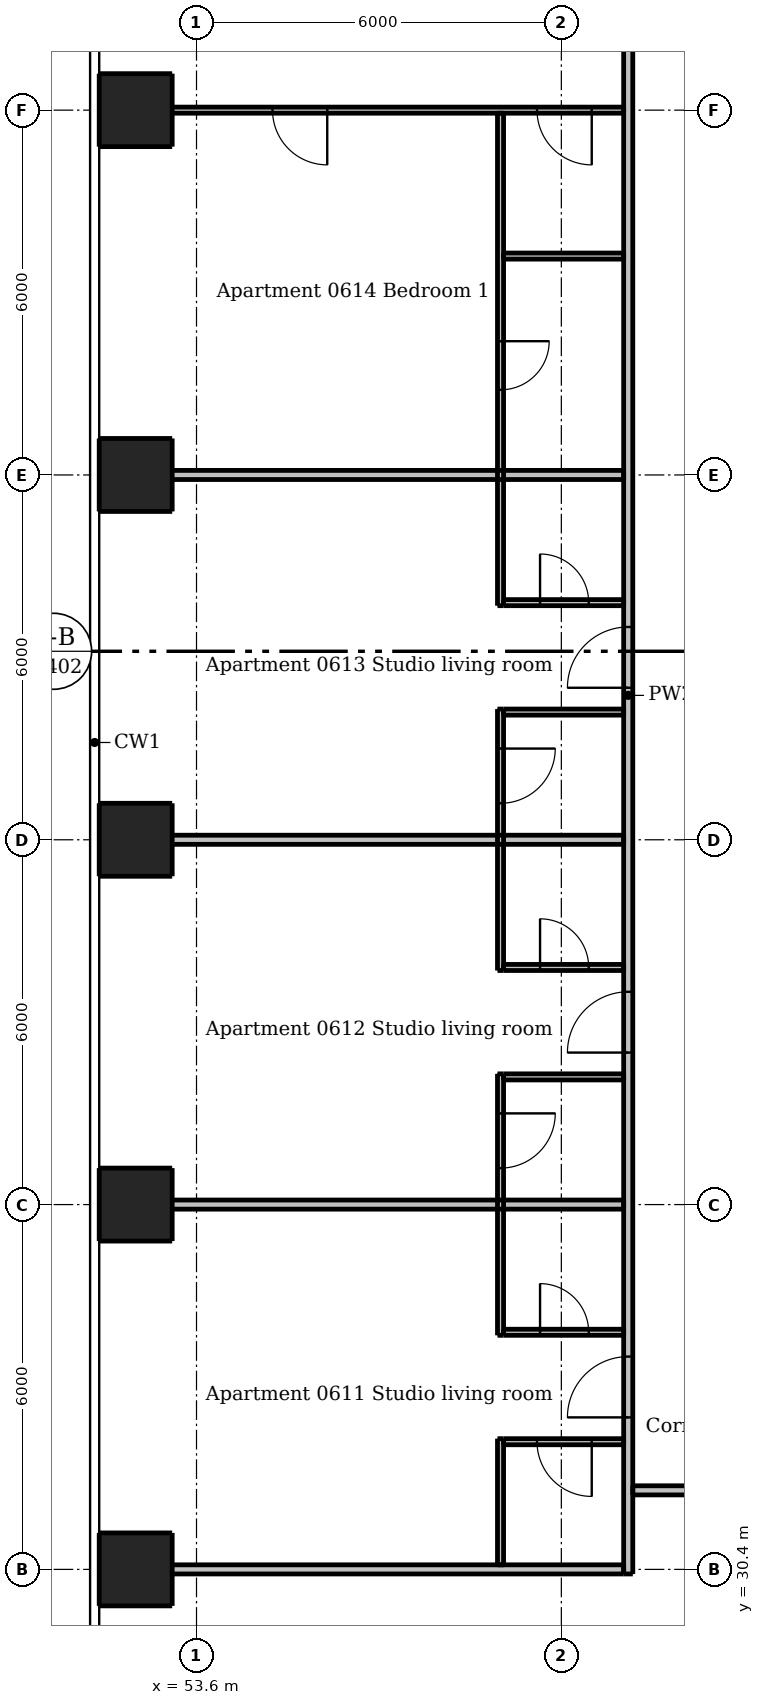
"""IFC4 building model, lengths in metres.
Left out: names, types, materials, properties, quantities, classifications, styles, units other than length and angle.
Written with IfcOpenShell. Run it as: python <this file> out.ifc"""

import sys

from ifc_helpers import new_model, si_unit, direction, frame, frame_2d, origin, origin_2d, place, context, subcontext, project, spatial, rectangle, extrude, element, fill, save


model = new_model("IFC4")
c1 = context("Model", 3, precision=1e-05, world=origin(), true_north=direction((0.0, 1.0)))
c2 = subcontext(c1, "Body", "Model", "MODEL_VIEW")
j1 = project(units=[si_unit("LENGTHUNIT", "METRE"), si_unit("PLANEANGLEUNIT", "RADIAN")], contexts=[c1])
p1 = place(None, origin())
s1 = spatial("IfcSite", under=j1, at=p1, CompositionType="ELEMENT")
p2 = place(p1, origin())
s2 = spatial("IfcBuilding", under=s1, at=p2, CompositionType="ELEMENT")
p3 = place(p2, frame((0.0, 0.0, 26.8)))
s3 = spatial("IfcBuildingStorey", under=s2, at=p3, CompositionType="ELEMENT", Elevation=26.8)
for number, where, z_axis, x_axis in (
    (1, (52.6, 30.4, 0.0), (0.0, 0.0, 1.0), (1.0, 0.0, 0.0)),
    (2, (52.6, 36.4, 0.0), (0.0, 0.0, 1.0), (1.0, 0.0, 0.0)),
    (3, (52.6, 42.4, 0.0), (0.0, 0.0, 1.0), (1.0, 0.0, 0.0)),
    (4, (52.6, 48.4, 0.0), (0.0, 0.0, 1.0), (1.0, 0.0, 0.0)),
    (5, (52.6, 54.4, 0.0), (0.0, 0.0, 1.0), (1.0, 0.0, 0.0)),
):
    element("IfcColumn", number, at=place(p3, frame(where, z_axis=z_axis, x_axis=x_axis)), inside=s3, PredefinedType="COLUMN", context=c2, shape_type="SweptSolid", body=[
        extrude(rectangle(XDim=1.2, YDim=1.2, at=origin_2d()), origin(), (0.0, 0.0, 1.0), 3.05),
    ])
p4 = place(p3, frame((58.6, 30.475, 0.0), z_axis=(0.0, 0.0, 1.0), x_axis=(0.0, 1.0, 0.0)))
e6 = element("IfcWall", 6, at=p4, inside=s3, PredefinedType="PARTITIONING", context=c2, shape_type="SweptSolid", body=[
    extrude(rectangle(XDim=2.075, YDim=0.1, at=frame_2d((1.038, 0.0))), origin(), (0.0, 0.0, 1.0), 3.05),
])
p5 = place(p3, frame((58.6, 38.55, 0.0), z_axis=(0.0, 0.0, 1.0), x_axis=(0.0, -1.0, 0.0)))
e7 = element("IfcWall", 7, at=p5, inside=s3, PredefinedType="PARTITIONING", context=c2, shape_type="SweptSolid", body=[
    extrude(rectangle(XDim=4.3, YDim=0.1, at=frame_2d((2.15, 0.0))), origin(), (0.0, 0.0, 1.0), 3.05),
])
p6 = place(p5, frame((0.65, 0.0, 0.0)))
e8 = element("IfcOpeningElement", 8, at=p6, cuts=e7, PredefinedType="OPENING", context=c2, shape_type="SweptSolid", body=[
    extrude(rectangle(XDim=0.9, YDim=2.1, at=frame_2d((0.45, 1.05))), frame((0.0, 0.06, 0.0), z_axis=(0.0, -1.0, 0.0), x_axis=(1.0, 0.0, 0.0)), (0.0, 0.0, 1.0), 0.12),
])
p7 = place(p3, frame((58.6, 44.55, 0.0), z_axis=(0.0, 0.0, 1.0), x_axis=(0.0, -1.0, 0.0)))
e9 = element("IfcWall", 9, at=p7, inside=s3, PredefinedType="PARTITIONING", context=c2, shape_type="SweptSolid", body=[
    extrude(rectangle(XDim=4.3, YDim=0.1, at=frame_2d((2.15, 0.0))), origin(), (0.0, 0.0, 1.0), 3.05),
])
p8 = place(p7, frame((0.65, 0.0, 0.0)))
e10 = element("IfcOpeningElement", 10, at=p8, cuts=e9, PredefinedType="OPENING", context=c2, shape_type="SweptSolid", body=[
    extrude(rectangle(XDim=0.9, YDim=2.1, at=frame_2d((0.45, 1.05))), frame((0.0, 0.06, 0.0), z_axis=(0.0, -1.0, 0.0), x_axis=(1.0, 0.0, 0.0)), (0.0, 0.0, 1.0), 0.12),
])
p9 = place(p3, frame((58.6, 54.35, 0.0), z_axis=(0.0, 0.0, 1.0), x_axis=(0.0, -1.0, 0.0)))
e11 = element("IfcWall", 11, at=p9, inside=s3, PredefinedType="PARTITIONING", context=c2, shape_type="SweptSolid", body=[
    extrude(rectangle(XDim=8.1, YDim=0.1, at=frame_2d((4.05, 0.0))), origin(), (0.0, 0.0, 1.0), 3.05),
])
p10 = place(p9, frame((3.75, 0.0, 0.0)))
e12 = element("IfcOpeningElement", 12, at=p10, cuts=e11, PredefinedType="OPENING", context=c2, shape_type="SweptSolid", body=[
    extrude(rectangle(XDim=0.8, YDim=2.1, at=frame_2d((0.4, 1.05))), frame((0.0, 0.06, 0.0), z_axis=(0.0, -1.0, 0.0), x_axis=(1.0, 0.0, 0.0)), (0.0, 0.0, 1.0), 0.12),
])
p11 = place(p3, frame((60.625, 54.4, 0.0), z_axis=(0.0, 0.0, 1.0), x_axis=(-1.0, 0.0, 0.0)))
e13 = element("IfcWall", 13, at=p11, inside=s3, PredefinedType="PARTITIONING", context=c2, shape_type="SweptSolid", body=[
    extrude(rectangle(XDim=8.625, YDim=0.1, at=frame_2d((4.312, 0.0))), origin(), (0.0, 0.0, 1.0), 2.516),
])
p12 = place(p11, frame((0.525, 0.0, 0.0)))
e14 = element("IfcOpeningElement", 14, at=p12, cuts=e13, PredefinedType="OPENING", context=c2, shape_type="SweptSolid", body=[
    extrude(rectangle(XDim=0.9, YDim=2.1, at=frame_2d((0.45, 1.05))), frame((0.0, 0.06, 0.0), z_axis=(0.0, -1.0, 0.0), x_axis=(1.0, 0.0, 0.0)), (0.0, 0.0, 1.0), 0.12),
])
p13 = place(p11, frame((4.875, 0.0, 0.0)))
e15 = element("IfcOpeningElement", 15, at=p13, cuts=e13, PredefinedType="OPENING", context=c2, shape_type="SweptSolid", body=[
    extrude(rectangle(XDim=0.9, YDim=2.1, at=frame_2d((0.45, 1.05))), frame((0.0, 0.06, 0.0), z_axis=(0.0, -1.0, 0.0), x_axis=(1.0, 0.0, 0.0)), (0.0, 0.0, 1.0), 0.12),
])
p14 = place(p3, frame((58.65, 52.0, 0.0), z_axis=(0.0, 0.0, 1.0), x_axis=(1.0, 0.0, 0.0)))
e16 = element("IfcWall", 16, at=p14, inside=s3, PredefinedType="PARTITIONING", context=c2, shape_type="SweptSolid", body=[
    extrude(rectangle(XDim=1.975, YDim=0.1, at=frame_2d((0.988, 0.0))), origin(), (0.0, 0.0, 1.0), 3.05),
])
p15 = place(p3, frame((58.65, 46.3, 0.0), z_axis=(0.0, 0.0, 1.0), x_axis=(1.0, 0.0, 0.0)))
e17 = element("IfcWall", 17, at=p15, inside=s3, PredefinedType="PARTITIONING", context=c2, shape_type="SweptSolid", body=[
    extrude(rectangle(XDim=1.975, YDim=0.1, at=frame_2d((0.988, 0.0))), origin(), (0.0, 0.0, 1.0), 3.05),
])
p16 = place(p15, frame((0.6, 0.0, 0.0)))
e18 = element("IfcOpeningElement", 18, at=p16, cuts=e17, PredefinedType="OPENING", context=c2, shape_type="SweptSolid", body=[
    extrude(rectangle(XDim=0.8, YDim=2.1, at=frame_2d((0.4, 1.05))), frame((0.0, 0.06, 0.0), z_axis=(0.0, -1.0, 0.0), x_axis=(1.0, 0.0, 0.0)), (0.0, 0.0, 1.0), 0.12),
])
p17 = place(p3, frame((58.65, 44.5, 0.0), z_axis=(0.0, 0.0, 1.0), x_axis=(1.0, 0.0, 0.0)))
e19 = element("IfcWall", 19, at=p17, inside=s3, PredefinedType="PARTITIONING", context=c2, shape_type="SweptSolid", body=[
    extrude(rectangle(XDim=1.975, YDim=0.1, at=frame_2d((0.988, 0.0))), origin(), (0.0, 0.0, 1.0), 3.05),
])
p18 = place(p3, frame((58.65, 40.3, 0.0), z_axis=(0.0, 0.0, 1.0), x_axis=(1.0, 0.0, 0.0)))
e20 = element("IfcWall", 20, at=p18, inside=s3, PredefinedType="PARTITIONING", context=c2, shape_type="SweptSolid", body=[
    extrude(rectangle(XDim=1.975, YDim=0.1, at=frame_2d((0.988, 0.0))), origin(), (0.0, 0.0, 1.0), 3.05),
])
p19 = place(p18, frame((0.6, 0.0, 0.0)))
e21 = element("IfcOpeningElement", 21, at=p19, cuts=e20, PredefinedType="OPENING", context=c2, shape_type="SweptSolid", body=[
    extrude(rectangle(XDim=0.8, YDim=2.1, at=frame_2d((0.4, 1.05))), frame((0.0, 0.06, 0.0), z_axis=(0.0, -1.0, 0.0), x_axis=(1.0, 0.0, 0.0)), (0.0, 0.0, 1.0), 0.12),
])
p20 = place(p3, frame((58.65, 38.5, 0.0), z_axis=(0.0, 0.0, 1.0), x_axis=(1.0, 0.0, 0.0)))
e22 = element("IfcWall", 22, at=p20, inside=s3, PredefinedType="PARTITIONING", context=c2, shape_type="SweptSolid", body=[
    extrude(rectangle(XDim=1.975, YDim=0.1, at=frame_2d((0.988, 0.0))), origin(), (0.0, 0.0, 1.0), 3.05),
])
p21 = place(p3, frame((58.65, 34.3, 0.0), z_axis=(0.0, 0.0, 1.0), x_axis=(1.0, 0.0, 0.0)))
e23 = element("IfcWall", 23, at=p21, inside=s3, PredefinedType="PARTITIONING", context=c2, shape_type="SweptSolid", body=[
    extrude(rectangle(XDim=1.975, YDim=0.1, at=frame_2d((0.988, 0.0))), origin(), (0.0, 0.0, 1.0), 3.05),
])
p22 = place(p21, frame((0.6, 0.0, 0.0)))
e24 = element("IfcOpeningElement", 24, at=p22, cuts=e23, PredefinedType="OPENING", context=c2, shape_type="SweptSolid", body=[
    extrude(rectangle(XDim=0.8, YDim=2.1, at=frame_2d((0.4, 1.05))), frame((0.0, 0.06, 0.0), z_axis=(0.0, -1.0, 0.0), x_axis=(1.0, 0.0, 0.0)), (0.0, 0.0, 1.0), 0.12),
])
p23 = place(p3, frame((60.625, 32.5, 0.0), z_axis=(0.0, 0.0, 1.0), x_axis=(-1.0, 0.0, 0.0)))
e25 = element("IfcWall", 25, at=p23, inside=s3, PredefinedType="PARTITIONING", context=c2, shape_type="SweptSolid", body=[
    extrude(rectangle(XDim=1.975, YDim=0.1, at=frame_2d((0.988, 0.0))), origin(), (0.0, 0.0, 1.0), 3.05),
])
p24 = place(p23, frame((0.525, 0.0, 0.0)))
e26 = element("IfcOpeningElement", 26, at=p24, cuts=e25, PredefinedType="OPENING", context=c2, shape_type="SweptSolid", body=[
    extrude(rectangle(XDim=0.9, YDim=2.1, at=frame_2d((0.45, 1.05))), frame((0.0, 0.06, 0.0), z_axis=(0.0, -1.0, 0.0), x_axis=(1.0, 0.0, 0.0)), (0.0, 0.0, 1.0), 0.12),
])
p25 = place(p3, frame((60.7, 30.325, 0.0), z_axis=(0.0, 0.0, 1.0), x_axis=(0.0, 1.0, 0.0)))
e27 = element("IfcWall", 27, at=p25, inside=s3, PredefinedType="PARTITIONING", context=c2, shape_type="SweptSolid", body=[
    extrude(rectangle(XDim=28.9, YDim=0.15, at=frame_2d((14.45, 0.0))), origin(), (0.0, 0.0, 1.0), 3.05),
])
p26 = place(p25, frame((2.575, 0.0, 0.0)))
e28 = element("IfcOpeningElement", 28, at=p26, cuts=e27, PredefinedType="OPENING", context=c2, shape_type="SweptSolid", body=[
    extrude(rectangle(XDim=1.0, YDim=2.1, at=frame_2d((0.5, 1.05))), frame((0.0, 0.085, 0.0), z_axis=(0.0, -1.0, 0.0), x_axis=(1.0, 0.0, 0.0)), (0.0, 0.0, 1.0), 0.17),
])
p27 = place(p25, frame((8.575, 0.0, 0.0)))
e29 = element("IfcOpeningElement", 29, at=p27, cuts=e27, PredefinedType="OPENING", context=c2, shape_type="SweptSolid", body=[
    extrude(rectangle(XDim=1.0, YDim=2.1, at=frame_2d((0.5, 1.05))), frame((0.0, 0.085, 0.0), z_axis=(0.0, -1.0, 0.0), x_axis=(1.0, 0.0, 0.0)), (0.0, 0.0, 1.0), 0.17),
])
p28 = place(p25, frame((14.575, 0.0, 0.0)))
e30 = element("IfcOpeningElement", 30, at=p28, cuts=e27, PredefinedType="OPENING", context=c2, shape_type="SweptSolid", body=[
    extrude(rectangle(XDim=1.0, YDim=2.1, at=frame_2d((0.5, 1.05))), frame((0.0, 0.085, 0.0), z_axis=(0.0, -1.0, 0.0), x_axis=(1.0, 0.0, 0.0)), (0.0, 0.0, 1.0), 0.17),
])
p29 = place(p25, frame((26.025, 0.0, 0.0)))
e31 = element("IfcOpeningElement", 31, at=p29, cuts=e27, PredefinedType="OPENING", context=c2, shape_type="SweptSolid", body=[
    extrude(rectangle(XDim=1.0, YDim=2.1, at=frame_2d((0.5, 1.05))), frame((0.0, 0.085, 0.0), z_axis=(0.0, -1.0, 0.0), x_axis=(1.0, 0.0, 0.0)), (0.0, 0.0, 1.0), 0.17),
])
for number, where, z_axis, x_axis in (
    (32, (52.0, 48.4, 0.0), (0.0, 0.0, 1.0), (1.0, 0.0, 0.0)),
    (33, (52.0, 42.4, 0.0), (0.0, 0.0, 1.0), (1.0, 0.0, 0.0)),
    (34, (52.0, 36.4, 0.0), (0.0, 0.0, 1.0), (1.0, 0.0, 0.0)),
):
    element("IfcWall", number, at=place(p3, frame(where, z_axis=z_axis, x_axis=x_axis)), inside=s3, PredefinedType="PARTITIONING", context=c2, shape_type="SweptSolid", body=[
        extrude(rectangle(XDim=8.625, YDim=0.15, at=frame_2d((4.312, 0.0))), origin(), (0.0, 0.0, 1.0), 2.516),
    ])
p30 = place(p3, frame((89.525, 31.7, 0.0), z_axis=(0.0, 0.0, 1.0), x_axis=(-1.0, 0.0, 0.0)))
e35 = element("IfcWall", 35, at=p30, inside=s3, PredefinedType="PARTITIONING", context=c2, shape_type="SweptSolid", body=[
    extrude(rectangle(XDim=28.75, YDim=0.15, at=frame_2d((14.375, 0.0))), origin(), (0.0, 0.0, 1.0), 3.05),
])
p31 = place(p30, frame((24.625, 0.0, 0.0)))
e36 = element("IfcOpeningElement", 36, at=p31, cuts=e35, PredefinedType="OPENING", context=c2, shape_type="SweptSolid", body=[
    extrude(rectangle(XDim=1.0, YDim=2.1, at=frame_2d((0.5, 1.05))), frame((0.0, 0.085, 0.0), z_axis=(0.0, -1.0, 0.0), x_axis=(1.0, 0.0, 0.0)), (0.0, 0.0, 1.0), 0.17),
])
p32 = place(p30, frame((10.225, 0.0, 0.0)))
e37 = element("IfcOpeningElement", 37, at=p32, cuts=e35, PredefinedType="OPENING", context=c2, shape_type="SweptSolid", body=[
    extrude(rectangle(XDim=1.0, YDim=2.1, at=frame_2d((0.5, 1.05))), frame((0.0, 0.085, 0.0), z_axis=(0.0, -1.0, 0.0), x_axis=(1.0, 0.0, 0.0)), (0.0, 0.0, 1.0), 0.17),
])
p33 = place(p30, frame((2.425, 0.0, 0.0)))
e38 = element("IfcOpeningElement", 38, at=p33, cuts=e35, PredefinedType="OPENING", context=c2, shape_type="SweptSolid", body=[
    extrude(rectangle(XDim=1.0, YDim=2.1, at=frame_2d((0.5, 1.05))), frame((0.0, 0.085, 0.0), z_axis=(0.0, -1.0, 0.0), x_axis=(1.0, 0.0, 0.0)), (0.0, 0.0, 1.0), 0.17),
])
p34 = place(p3, frame((52.0, 30.4, 0.0), z_axis=(0.0, 0.0, 1.0), x_axis=(1.0, 0.0, 0.0)))
e39 = element("IfcWall", 39, at=p34, inside=s3, PredefinedType="PARTITIONING", context=c2, shape_type="SweptSolid", body=[
    extrude(rectangle(XDim=8.625, YDim=0.15, at=frame_2d((4.312, 0.0))), origin(), (0.0, 0.0, 1.0), 2.647),
])
p35 = place(p26, origin())
e40 = element("IfcDoor", 40, at=p35, inside=s3, OperationType="SINGLE_SWING_LEFT", PredefinedType="DOOR", context=c2, shape_type="SweptSolid", body=[
    extrude(rectangle(XDim=1.0, YDim=2.1, at=frame_2d((0.5, 1.05))), frame((0.0, 0.025, 0.0), z_axis=(0.0, -1.0, 0.0), x_axis=(1.0, 0.0, 0.0)), (0.0, 0.0, 1.0), 0.05),
])
fill(e28, e40)
p36 = place(p24, origin())
e41 = element("IfcDoor", 41, at=p36, inside=s3, OperationType="SINGLE_SWING_LEFT", PredefinedType="DOOR", context=c2, shape_type="SweptSolid", body=[
    extrude(rectangle(XDim=0.9, YDim=2.1, at=frame_2d((0.45, 1.05))), frame((0.0, 0.025, 0.0), z_axis=(0.0, -1.0, 0.0), x_axis=(1.0, 0.0, 0.0)), (0.0, 0.0, 1.0), 0.05),
])
fill(e26, e41)
p37 = place(p22, origin())
e42 = element("IfcDoor", 42, at=p37, inside=s3, OperationType="SINGLE_SWING_LEFT", PredefinedType="DOOR", context=c2, shape_type="SweptSolid", body=[
    extrude(rectangle(XDim=0.8, YDim=2.1, at=frame_2d((0.4, 1.05))), frame((0.0, 0.025, 0.0), z_axis=(0.0, -1.0, 0.0), x_axis=(1.0, 0.0, 0.0)), (0.0, 0.0, 1.0), 0.05),
])
fill(e24, e42)
p38 = place(p27, origin())
e43 = element("IfcDoor", 43, at=p38, inside=s3, OperationType="SINGLE_SWING_LEFT", PredefinedType="DOOR", context=c2, shape_type="SweptSolid", body=[
    extrude(rectangle(XDim=1.0, YDim=2.1, at=frame_2d((0.5, 1.05))), frame((0.0, 0.025, 0.0), z_axis=(0.0, -1.0, 0.0), x_axis=(1.0, 0.0, 0.0)), (0.0, 0.0, 1.0), 0.05),
])
fill(e29, e43)
p39 = place(p6, origin())
e44 = element("IfcDoor", 44, at=p39, inside=s3, OperationType="SINGLE_SWING_LEFT", PredefinedType="DOOR", context=c2, shape_type="SweptSolid", body=[
    extrude(rectangle(XDim=0.9, YDim=2.1, at=frame_2d((0.45, 1.05))), frame((0.0, 0.025, 0.0), z_axis=(0.0, -1.0, 0.0), x_axis=(1.0, 0.0, 0.0)), (0.0, 0.0, 1.0), 0.05),
])
fill(e8, e44)
p40 = place(p19, origin())
e45 = element("IfcDoor", 45, at=p40, inside=s3, OperationType="SINGLE_SWING_LEFT", PredefinedType="DOOR", context=c2, shape_type="SweptSolid", body=[
    extrude(rectangle(XDim=0.8, YDim=2.1, at=frame_2d((0.4, 1.05))), frame((0.0, 0.025, 0.0), z_axis=(0.0, -1.0, 0.0), x_axis=(1.0, 0.0, 0.0)), (0.0, 0.0, 1.0), 0.05),
])
fill(e21, e45)
p41 = place(p28, origin())
e46 = element("IfcDoor", 46, at=p41, inside=s3, OperationType="SINGLE_SWING_LEFT", PredefinedType="DOOR", context=c2, shape_type="SweptSolid", body=[
    extrude(rectangle(XDim=1.0, YDim=2.1, at=frame_2d((0.5, 1.05))), frame((0.0, 0.025, 0.0), z_axis=(0.0, -1.0, 0.0), x_axis=(1.0, 0.0, 0.0)), (0.0, 0.0, 1.0), 0.05),
])
fill(e30, e46)
p42 = place(p8, origin())
e47 = element("IfcDoor", 47, at=p42, inside=s3, OperationType="SINGLE_SWING_LEFT", PredefinedType="DOOR", context=c2, shape_type="SweptSolid", body=[
    extrude(rectangle(XDim=0.9, YDim=2.1, at=frame_2d((0.45, 1.05))), frame((0.0, 0.025, 0.0), z_axis=(0.0, -1.0, 0.0), x_axis=(1.0, 0.0, 0.0)), (0.0, 0.0, 1.0), 0.05),
])
fill(e10, e47)
p43 = place(p16, origin())
e48 = element("IfcDoor", 48, at=p43, inside=s3, OperationType="SINGLE_SWING_LEFT", PredefinedType="DOOR", context=c2, shape_type="SweptSolid", body=[
    extrude(rectangle(XDim=0.8, YDim=2.1, at=frame_2d((0.4, 1.05))), frame((0.0, 0.025, 0.0), z_axis=(0.0, -1.0, 0.0), x_axis=(1.0, 0.0, 0.0)), (0.0, 0.0, 1.0), 0.05),
])
fill(e18, e48)
p44 = place(p12, origin())
e49 = element("IfcDoor", 49, at=p44, inside=s3, OperationType="SINGLE_SWING_LEFT", PredefinedType="DOOR", context=c2, shape_type="SweptSolid", body=[
    extrude(rectangle(XDim=0.9, YDim=2.1, at=frame_2d((0.45, 1.05))), frame((0.0, 0.025, 0.0), z_axis=(0.0, -1.0, 0.0), x_axis=(1.0, 0.0, 0.0)), (0.0, 0.0, 1.0), 0.05),
])
fill(e14, e49)
p45 = place(p13, origin())
e50 = element("IfcDoor", 50, at=p45, inside=s3, OperationType="SINGLE_SWING_LEFT", PredefinedType="DOOR", context=c2, shape_type="SweptSolid", body=[
    extrude(rectangle(XDim=0.9, YDim=2.1, at=frame_2d((0.45, 1.05))), frame((0.0, 0.025, 0.0), z_axis=(0.0, -1.0, 0.0), x_axis=(1.0, 0.0, 0.0)), (0.0, 0.0, 1.0), 0.05),
])
fill(e15, e50)
p46 = place(p10, origin())
e51 = element("IfcDoor", 51, at=p46, inside=s3, OperationType="SINGLE_SWING_LEFT", PredefinedType="DOOR", context=c2, shape_type="SweptSolid", body=[
    extrude(rectangle(XDim=0.8, YDim=2.1, at=frame_2d((0.4, 1.05))), frame((0.0, 0.025, 0.0), z_axis=(0.0, -1.0, 0.0), x_axis=(1.0, 0.0, 0.0)), (0.0, 0.0, 1.0), 0.05),
])
fill(e12, e51)
save(model, sys.argv[1])
